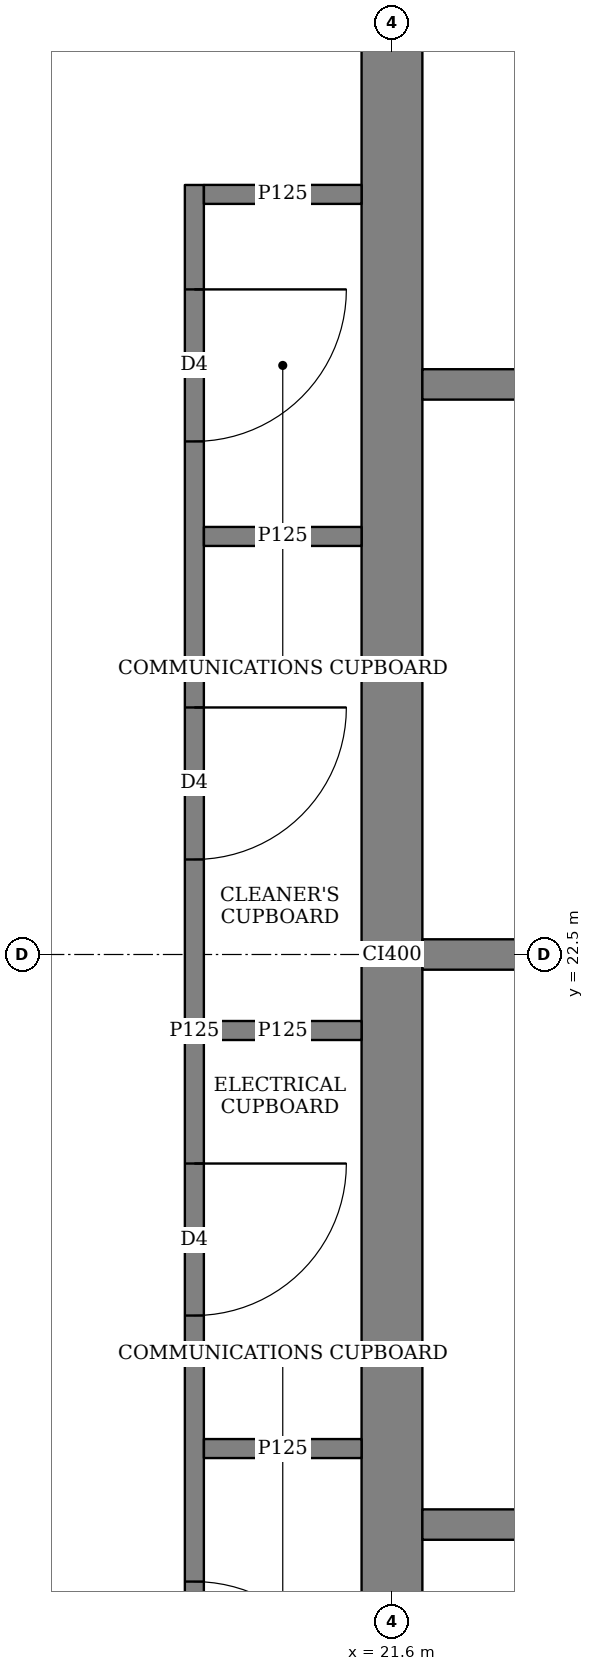
"""IFC4 building model, lengths in metres.
Left out: names, types, materials, properties, quantities, classifications, styles, units other than length and angle.
Written with IfcOpenShell. Run it as: python <this file> out.ifc"""

import sys

from ifc_helpers import new_model, si_unit, direction, frame, frame_2d, origin, place, context, subcontext, project, spatial, rectangle, extrude, element, fill, save


model = new_model("IFC4")
c1 = context("Model", 3, precision=1e-05, world=origin(), true_north=direction((0.0, 1.0)))
c2 = subcontext(c1, "Body", "Model", "MODEL_VIEW")
j1 = project(units=[si_unit("LENGTHUNIT", "METRE"), si_unit("PLANEANGLEUNIT", "RADIAN")], contexts=[c1])
p1 = place(None, origin())
s1 = spatial("IfcSite", under=j1, at=p1, CompositionType="ELEMENT")
p2 = place(p1, origin())
s2 = spatial("IfcBuilding", under=s1, at=p2, CompositionType="ELEMENT")
p3 = place(p2, frame((0.0, 0.0, 20.0)))
s3 = spatial("IfcBuildingStorey", under=s2, at=p3, CompositionType="ELEMENT", Elevation=20.0)
p4 = place(p3, frame((21.6, 15.45, 0.0), z_axis=(0.0, 0.0, 1.0), x_axis=(0.0, 1.0, 0.0)))
e1 = element("IfcWall", 1, at=p4, inside=s3, PredefinedType="SHEAR", context=c2, shape_type="SweptSolid", body=[
    extrude(rectangle(XDim=14.1, YDim=0.4, at=frame_2d((7.05, 0.0))), origin(), (0.0, 0.0, 1.0), 3.75),
])
p5 = place(p3, frame((20.3, 16.438, 0.0), z_axis=(0.0, 0.0, 1.0), x_axis=(0.0, 1.0, 0.0)))
e2 = element("IfcWall", 2, at=p5, inside=s3, PredefinedType="PARTITIONING", context=c2, shape_type="SweptSolid", body=[
    extrude(rectangle(XDim=11.124, YDim=0.125, at=frame_2d((5.562, 0.0))), origin(), (0.0, 0.0, 1.0), 3.5),
])
p6 = place(p5, frame((0.937, 0.0, 0.0)))
e3 = element("IfcOpeningElement", 3, at=p6, cuts=e2, PredefinedType="OPENING", context=c2, shape_type="SweptSolid", body=[
    extrude(rectangle(XDim=1.0, YDim=2.1, at=frame_2d((0.5, 1.05))), frame((0.0, 0.073, 0.0), z_axis=(0.0, -1.0, 0.0), x_axis=(1.0, 0.0, 0.0)), (0.0, 0.0, 1.0), 0.145),
])
p7 = place(p5, frame((3.687, 0.0, 0.0)))
e4 = element("IfcOpeningElement", 4, at=p7, cuts=e2, PredefinedType="OPENING", context=c2, shape_type="SweptSolid", body=[
    extrude(rectangle(XDim=1.0, YDim=2.1, at=frame_2d((0.5, 1.05))), frame((0.0, 0.073, 0.0), z_axis=(0.0, -1.0, 0.0), x_axis=(1.0, 0.0, 0.0)), (0.0, 0.0, 1.0), 0.145),
])
p8 = place(p5, frame((6.687, 0.0, 0.0)))
e5 = element("IfcOpeningElement", 5, at=p8, cuts=e2, PredefinedType="OPENING", context=c2, shape_type="SweptSolid", body=[
    extrude(rectangle(XDim=1.0, YDim=2.1, at=frame_2d((0.5, 1.05))), frame((0.0, 0.073, 0.0), z_axis=(0.0, -1.0, 0.0), x_axis=(1.0, 0.0, 0.0)), (0.0, 0.0, 1.0), 0.145),
])
p9 = place(p5, frame((9.437, 0.0, 0.0)))
e6 = element("IfcOpeningElement", 6, at=p9, cuts=e2, PredefinedType="OPENING", context=c2, shape_type="SweptSolid", body=[
    extrude(rectangle(XDim=1.0, YDim=2.1, at=frame_2d((0.5, 1.05))), frame((0.0, 0.073, 0.0), z_axis=(0.0, -1.0, 0.0), x_axis=(1.0, 0.0, 0.0)), (0.0, 0.0, 1.0), 0.145),
])
for number, where, z_axis, x_axis in (
    (7, (20.363, 27.5, 0.0), (0.0, 0.0, 1.0), (1.0, 0.0, 0.0)),
    (8, (20.363, 19.25, 0.0), (0.0, 0.0, 1.0), (1.0, 0.0, 0.0)),
    (9, (20.363, 22.0, 0.0), (0.0, 0.0, 1.0), (1.0, 0.0, 0.0)),
    (10, (20.363, 25.25, 0.0), (0.0, 0.0, 1.0), (1.0, 0.0, 0.0)),
):
    element("IfcWall", number, at=place(p3, frame(where, z_axis=z_axis, x_axis=x_axis)), inside=s3, PredefinedType="PARTITIONING", context=c2, shape_type="SweptSolid", body=[
        extrude(rectangle(XDim=1.037, YDim=0.125, at=frame_2d((0.519, 0.0))), origin(), (0.0, 0.0, 1.0), 3.5),
    ])
for number, where, z_axis, x_axis in (
    (11, (21.8, 18.75, 0.0), (0.0, 0.0, 1.0), (1.0, 0.0, 0.0)),
    (12, (21.8, 22.5, 0.0), (0.0, 0.0, 1.0), (1.0, 0.0, 0.0)),
    (13, (21.8, 26.25, 0.0), (0.0, 0.0, 1.0), (1.0, 0.0, 0.0)),
):
    element("IfcWall", number, at=place(p3, frame(where, z_axis=z_axis, x_axis=x_axis)), inside=s3, PredefinedType="SOLIDWALL", context=c2, shape_type="SweptSolid", body=[
        extrude(rectangle(XDim=2.2, YDim=0.2, at=frame_2d((1.1, 0.0))), origin(), (0.0, 0.0, 1.0), 3.5),
    ])
p10 = place(p6, origin())
e14 = element("IfcDoor", 14, at=p10, inside=s3, OperationType="SINGLE_SWING_RIGHT", PredefinedType="DOOR", context=c2, shape_type="SweptSolid", body=[
    extrude(rectangle(XDim=1.0, YDim=2.1, at=frame_2d((0.5, 1.05))), frame((0.0, 0.025, 0.0), z_axis=(0.0, -1.0, 0.0), x_axis=(1.0, 0.0, 0.0)), (0.0, 0.0, 1.0), 0.05),
])
fill(e3, e14)
p11 = place(p7, origin())
e15 = element("IfcDoor", 15, at=p11, inside=s3, OperationType="SINGLE_SWING_LEFT", PredefinedType="DOOR", context=c2, shape_type="SweptSolid", body=[
    extrude(rectangle(XDim=1.0, YDim=2.1, at=frame_2d((0.5, 1.05))), frame((0.0, 0.025, 0.0), z_axis=(0.0, -1.0, 0.0), x_axis=(1.0, 0.0, 0.0)), (0.0, 0.0, 1.0), 0.05),
])
fill(e4, e15)
p12 = place(p8, origin())
e16 = element("IfcDoor", 16, at=p12, inside=s3, OperationType="SINGLE_SWING_LEFT", PredefinedType="DOOR", context=c2, shape_type="SweptSolid", body=[
    extrude(rectangle(XDim=1.0, YDim=2.1, at=frame_2d((0.5, 1.05))), frame((0.0, 0.025, 0.0), z_axis=(0.0, -1.0, 0.0), x_axis=(1.0, 0.0, 0.0)), (0.0, 0.0, 1.0), 0.05),
])
fill(e5, e16)
p13 = place(p9, origin())
e17 = element("IfcDoor", 17, at=p13, inside=s3, OperationType="SINGLE_SWING_LEFT", PredefinedType="DOOR", context=c2, shape_type="SweptSolid", body=[
    extrude(rectangle(XDim=1.0, YDim=2.1, at=frame_2d((0.5, 1.05))), frame((0.0, 0.025, 0.0), z_axis=(0.0, -1.0, 0.0), x_axis=(1.0, 0.0, 0.0)), (0.0, 0.0, 1.0), 0.05),
])
fill(e6, e17)
save(model, sys.argv[1])
